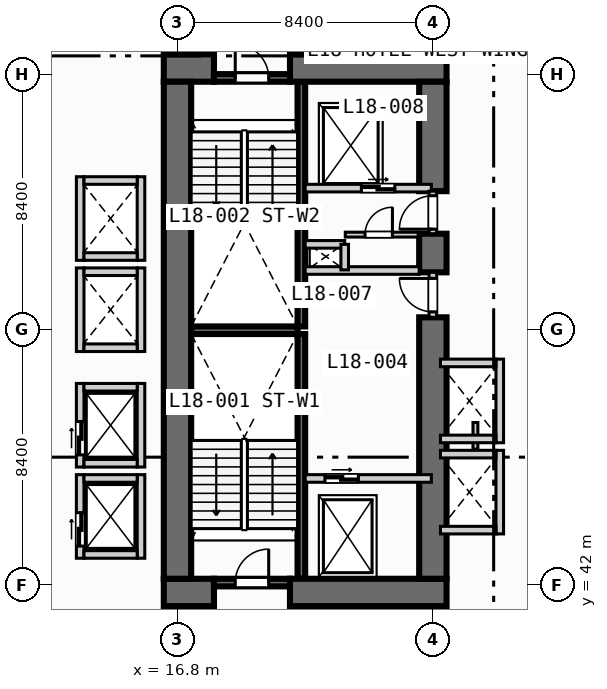
"""IFC4 building model, lengths in metres.
Left out: names, types, materials, properties, quantities, classifications, styles, units other than length and angle.
Written with IfcOpenShell. Run it as: python <this file> out.ifc"""

import sys

from ifc_helpers import new_model, si_unit, direction, frame, frame_2d, origin, place, context, subcontext, project, spatial, rectangle, extrude, element, fill, save


model = new_model("IFC4")
c1 = context("Model", 3, precision=1e-05, world=origin(), true_north=direction((0.0, 1.0)))
c2 = subcontext(c1, "Body", "Model", "MODEL_VIEW")
j1 = project(units=[si_unit("LENGTHUNIT", "METRE"), si_unit("PLANEANGLEUNIT", "RADIAN")], contexts=[c1])
p1 = place(None, origin())
s1 = spatial("IfcSite", under=j1, at=p1, CompositionType="ELEMENT")
p2 = place(p1, origin())
s2 = spatial("IfcBuilding", under=s1, at=p2, CompositionType="ELEMENT")
p3 = place(p2, frame((0.0, 0.0, 77.6)))
s3 = spatial("IfcBuildingStorey", under=s2, at=p3, CompositionType="ELEMENT", Elevation=77.6)
for number, where, z_axis, x_axis in (
    (1, (20.875, 42.2, 0.0), (0.0, 0.0, 1.0), (0.0, 1.0, 0.0)),
    (2, (20.875, 50.5, 0.0), (0.0, 0.0, 1.0), (0.0, 1.0, 0.0)),
):
    element("IfcWall", number, at=place(p3, frame(where, z_axis=z_axis, x_axis=x_axis)), inside=s3, PredefinedType="SOLIDWALL", context=c2, shape_type="SweptSolid", body=[
        extrude(rectangle(XDim=8.05, YDim=0.25, at=frame_2d((4.025, 0.0))), origin(), (0.0, 0.0, 1.0), 3.55),
    ])
p4 = place(p3, frame((17.25, 50.375, 0.0), z_axis=(0.0, 0.0, 1.0), x_axis=(1.0, 0.0, 0.0)))
e3 = element("IfcWall", 3, at=p4, inside=s3, PredefinedType="SOLIDWALL", context=c2, shape_type="SweptSolid", body=[
    extrude(rectangle(XDim=3.5, YDim=0.25, at=frame_2d((1.75, 0.0))), origin(), (0.0, 0.0, 1.0), 3.55),
])
p5 = place(p3, frame((16.35, 41.75, 0.0), z_axis=(0.0, 0.0, 1.0), x_axis=(1.0, 0.0, 0.0)))
e4 = element("IfcWall", 4, at=p5, inside=s3, PredefinedType="SHEAR", context=c2, shape_type="SweptSolid", body=[
    extrude(rectangle(XDim=1.65, YDim=0.9, at=frame_2d((0.825, 0.0))), origin(), (0.0, 0.0, 1.0), 3.55),
])
p6 = place(p3, frame((20.5, 41.75, 0.0), z_axis=(0.0, 0.0, 1.0), x_axis=(1.0, 0.0, 0.0)))
e5 = element("IfcWall", 5, at=p6, inside=s3, PredefinedType="SHEAR", context=c2, shape_type="SweptSolid", body=[
    extrude(rectangle(XDim=5.15, YDim=0.9, at=frame_2d((2.575, 0.0))), origin(), (0.0, 0.0, 1.0), 3.55),
])
p7 = place(p3, frame((16.35, 59.0, 0.0), z_axis=(0.0, 0.0, 1.0), x_axis=(1.0, 0.0, 0.0)))
e6 = element("IfcWall", 6, at=p7, inside=s3, PredefinedType="SHEAR", context=c2, shape_type="SweptSolid", body=[
    extrude(rectangle(XDim=1.65, YDim=0.9, at=frame_2d((0.825, 0.0))), origin(), (0.0, 0.0, 1.0), 3.55),
])
p8 = place(p3, frame((20.5, 59.0, 0.0), z_axis=(0.0, 0.0, 1.0), x_axis=(1.0, 0.0, 0.0)))
e7 = element("IfcWall", 7, at=p8, inside=s3, PredefinedType="SHEAR", context=c2, shape_type="SweptSolid", body=[
    extrude(rectangle(XDim=5.15, YDim=0.9, at=frame_2d((2.575, 0.0))), origin(), (0.0, 0.0, 1.0), 3.55),
])
p9 = place(p3, frame((16.8, 42.2, 0.0), z_axis=(0.0, 0.0, 1.0), x_axis=(0.0, 1.0, 0.0)))
e8 = element("IfcWall", 8, at=p9, inside=s3, PredefinedType="SHEAR", context=c2, shape_type="SweptSolid", body=[
    extrude(rectangle(XDim=16.35, YDim=0.9, at=frame_2d((8.175, 0.0))), origin(), (0.0, 0.0, 1.0), 3.55),
])
p10 = place(p3, frame((25.2, 42.2, 0.0), z_axis=(0.0, 0.0, 1.0), x_axis=(0.0, 1.0, 0.0)))
e9 = element("IfcWall", 9, at=p10, inside=s3, PredefinedType="SHEAR", context=c2, shape_type="SweptSolid", body=[
    extrude(rectangle(XDim=8.6, YDim=0.9, at=frame_2d((4.3, 0.0))), origin(), (0.0, 0.0, 1.0), 3.55),
])
p11 = place(p3, frame((25.2, 52.28, 0.0), z_axis=(0.0, 0.0, 1.0), x_axis=(0.0, 1.0, 0.0)))
e10 = element("IfcWall", 10, at=p11, inside=s3, PredefinedType="SHEAR", context=c2, shape_type="SweptSolid", body=[
    extrude(rectangle(XDim=1.27, YDim=0.9, at=frame_2d((0.635, 0.0))), origin(), (0.0, 0.0, 1.0), 3.55),
])
p12 = place(p3, frame((25.2, 54.95, 0.0), z_axis=(0.0, 0.0, 1.0), x_axis=(0.0, 1.0, 0.0)))
e11 = element("IfcWall", 11, at=p12, inside=s3, PredefinedType="SHEAR", context=c2, shape_type="SweptSolid", body=[
    extrude(rectangle(XDim=3.6, YDim=0.9, at=frame_2d((1.8, 0.0))), origin(), (0.0, 0.0, 1.0), 3.55),
])
p13 = place(p3, frame((18.0, 42.075, 0.0), z_axis=(0.0, 0.0, 1.0), x_axis=(1.0, 0.0, 0.0)))
e12 = element("IfcWall", 12, at=p13, inside=s3, PredefinedType="SOLIDWALL", context=c2, shape_type="SweptSolid", body=[
    extrude(rectangle(XDim=2.5, YDim=0.25, at=frame_2d((1.25, 0.0))), origin(), (0.0, 0.0, 1.0), 3.55),
])
p14 = place(p13, frame((0.7, 0.0, 0.0)))
e13 = element("IfcOpeningElement", 13, at=p14, cuts=e12, PredefinedType="OPENING", context=c2, shape_type="SweptSolid", body=[
    extrude(rectangle(XDim=1.1, YDim=2.15, at=frame_2d((0.55, 1.075))), frame((0.0, 0.135, 0.0), z_axis=(0.0, -1.0, 0.0), x_axis=(1.0, 0.0, 0.0)), (0.0, 0.0, 1.0), 0.27),
])
p15 = place(p3, frame((18.0, 58.675, 0.0), z_axis=(0.0, 0.0, 1.0), x_axis=(1.0, 0.0, 0.0)))
e14 = element("IfcWall", 14, at=p15, inside=s3, PredefinedType="SOLIDWALL", context=c2, shape_type="SweptSolid", body=[
    extrude(rectangle(XDim=2.5, YDim=0.25, at=frame_2d((1.25, 0.0))), origin(), (0.0, 0.0, 1.0), 3.55),
])
p16 = place(p15, frame((0.7, 0.0, 0.0)))
e15 = element("IfcOpeningElement", 15, at=p16, cuts=e14, PredefinedType="OPENING", context=c2, shape_type="SweptSolid", body=[
    extrude(rectangle(XDim=1.1, YDim=2.15, at=frame_2d((0.55, 1.075))), frame((0.0, 0.135, 0.0), z_axis=(0.0, -1.0, 0.0), x_axis=(1.0, 0.0, 0.0)), (0.0, 0.0, 1.0), 0.27),
])
p17 = place(p3, frame((21.0, 45.5, 0.0), z_axis=(0.0, 0.0, 1.0), x_axis=(1.0, 0.0, 0.0)))
e16 = element("IfcWall", 16, at=p17, inside=s3, PredefinedType="SOLIDWALL", context=c2, shape_type="SweptSolid", body=[
    extrude(rectangle(XDim=4.15, YDim=0.25, at=frame_2d((2.075, 0.0))), origin(), (0.0, 0.0, 1.0), 3.55),
])
p18 = place(p17, frame((0.65, 0.0, 0.0)))
e17 = element("IfcOpeningElement", 17, at=p18, cuts=e16, PredefinedType="OPENING", context=c2, shape_type="SweptSolid", body=[
    extrude(rectangle(XDim=1.1, YDim=2.15, at=frame_2d((0.55, 1.075))), frame((0.0, 0.135, 0.0), z_axis=(0.0, -1.0, 0.0), x_axis=(1.0, 0.0, 0.0)), (0.0, 0.0, 1.0), 0.27),
])
p19 = place(p3, frame((25.2, 50.8, 0.0), z_axis=(0.0, 0.0, 1.0), x_axis=(0.0, 1.0, 0.0)))
e18 = element("IfcWall", 18, at=p19, inside=s3, PredefinedType="SOLIDWALL", context=c2, shape_type="SweptSolid", body=[
    extrude(rectangle(XDim=1.48, YDim=0.25, at=frame_2d((0.74, 0.0))), origin(), (0.0, 0.0, 1.0), 3.55),
])
p20 = place(p19, frame((0.18, 0.0, 0.0)))
e19 = element("IfcOpeningElement", 19, at=p20, cuts=e18, PredefinedType="OPENING", context=c2, shape_type="SweptSolid", body=[
    extrude(rectangle(XDim=1.1, YDim=2.15, at=frame_2d((0.55, 1.075))), frame((0.0, 0.135, 0.0), z_axis=(0.0, -1.0, 0.0), x_axis=(1.0, 0.0, 0.0)), (0.0, 0.0, 1.0), 0.27),
])
p21 = place(p3, frame((21.0, 52.34, 0.0), z_axis=(0.0, 0.0, 1.0), x_axis=(1.0, 0.0, 0.0)))
e20 = element("IfcWall", 20, at=p21, inside=s3, PredefinedType="SOLIDWALL", context=c2, shape_type="SweptSolid", body=[
    extrude(rectangle(XDim=3.75, YDim=0.25, at=frame_2d((1.875, 0.0))), origin(), (0.0, 0.0, 1.0), 3.55),
])
p22 = place(p3, frame((21.0, 55.05, 0.0), z_axis=(0.0, 0.0, 1.0), x_axis=(1.0, 0.0, 0.0)))
e21 = element("IfcWall", 21, at=p22, inside=s3, PredefinedType="SOLIDWALL", context=c2, shape_type="SweptSolid", body=[
    extrude(rectangle(XDim=4.15, YDim=0.25, at=frame_2d((2.075, 0.0))), origin(), (0.0, 0.0, 1.0), 3.55),
])
p23 = place(p22, frame((1.85, 0.0, 0.0)))
e22 = element("IfcOpeningElement", 22, at=p23, cuts=e21, PredefinedType="OPENING", context=c2, shape_type="SweptSolid", body=[
    extrude(rectangle(XDim=1.1, YDim=2.15, at=frame_2d((0.55, 1.075))), frame((0.0, 0.135, 0.0), z_axis=(0.0, -1.0, 0.0), x_axis=(1.0, 0.0, 0.0)), (0.0, 0.0, 1.0), 0.27),
])
p24 = place(p3, frame((25.2, 53.55, 0.0), z_axis=(0.0, 0.0, 1.0), x_axis=(0.0, 1.0, 0.0)))
e23 = element("IfcWall", 23, at=p24, inside=s3, PredefinedType="SOLIDWALL", context=c2, shape_type="SweptSolid", body=[
    extrude(rectangle(XDim=1.4, YDim=0.25, at=frame_2d((0.7, 0.0))), origin(), (0.0, 0.0, 1.0), 3.55),
])
p25 = place(p24, frame((0.15, 0.0, 0.0)))
e24 = element("IfcOpeningElement", 24, at=p25, cuts=e23, PredefinedType="OPENING", context=c2, shape_type="SweptSolid", body=[
    extrude(rectangle(XDim=1.1, YDim=2.15, at=frame_2d((0.55, 1.075))), frame((0.0, 0.135, 0.0), z_axis=(0.0, -1.0, 0.0), x_axis=(1.0, 0.0, 0.0)), (0.0, 0.0, 1.0), 0.27),
])
p26 = place(p3, frame((21.0, 53.2, 0.0), z_axis=(0.0, 0.0, 1.0), x_axis=(1.0, 0.0, 0.0)))
e25 = element("IfcWall", 25, at=p26, inside=s3, PredefinedType="SOLIDWALL", context=c2, shape_type="SweptSolid", body=[
    extrude(rectangle(XDim=1.3, YDim=0.25, at=frame_2d((0.65, 0.0))), origin(), (0.0, 0.0, 1.0), 3.55),
])
p27 = place(p3, frame((22.3, 52.36, 0.0), z_axis=(0.0, 0.0, 1.0), x_axis=(0.0, 1.0, 0.0)))
e26 = element("IfcWall", 26, at=p27, inside=s3, PredefinedType="SOLIDWALL", context=c2, shape_type="SweptSolid", body=[
    extrude(rectangle(XDim=0.84, YDim=0.25, at=frame_2d((0.42, 0.0))), origin(), (0.0, 0.0, 1.0), 3.55),
])
p28 = place(p3, frame((22.32, 53.52, 0.0), z_axis=(0.0, 0.0, 1.0), x_axis=(1.0, 0.0, 0.0)))
e27 = element("IfcWall", 27, at=p28, inside=s3, PredefinedType="PARTITIONING", context=c2, shape_type="SweptSolid", body=[
    extrude(rectangle(XDim=2.4, YDim=0.16, at=frame_2d((1.2, 0.0))), origin(), (0.0, 0.0, 1.0), 3.55),
])
p29 = place(p28, frame((0.65, 0.0, 0.0)))
e28 = element("IfcOpeningElement", 28, at=p29, cuts=e27, PredefinedType="OPENING", context=c2, shape_type="SweptSolid", body=[
    extrude(rectangle(XDim=0.9, YDim=2.1, at=frame_2d((0.45, 1.05))), frame((0.0, 0.09, 0.0), z_axis=(0.0, -1.0, 0.0), x_axis=(1.0, 0.0, 0.0)), (0.0, 0.0, 1.0), 0.18),
])
p30 = place(p3, frame((13.6, 42.875, 0.0), z_axis=(0.0, 0.0, 1.0), x_axis=(0.0, 1.0, 0.0)))
e29 = element("IfcWall", 29, at=p30, inside=s3, PredefinedType="SOLIDWALL", context=c2, shape_type="SweptSolid", body=[
    extrude(rectangle(XDim=2.75, YDim=0.25, at=frame_2d((1.375, 0.0))), origin(), (0.0, 0.0, 1.0), 3.55),
])
p31 = place(p30, frame((0.4, 0.0, 0.0)))
e30 = element("IfcOpeningElement", 30, at=p31, cuts=e29, PredefinedType="OPENING", context=c2, shape_type="SweptSolid", body=[
    extrude(rectangle(XDim=1.1, YDim=2.15, at=frame_2d((0.55, 1.075))), frame((0.0, 0.135, 0.0), z_axis=(0.0, -1.0, 0.0), x_axis=(1.0, 0.0, 0.0)), (0.0, 0.0, 1.0), 0.27),
])
p32 = place(p3, frame((15.6, 42.875, 0.0), z_axis=(0.0, 0.0, 1.0), x_axis=(0.0, 1.0, 0.0)))
e31 = element("IfcWall", 31, at=p32, inside=s3, PredefinedType="SOLIDWALL", context=c2, shape_type="SweptSolid", body=[
    extrude(rectangle(XDim=2.75, YDim=0.25, at=frame_2d((1.375, 0.0))), origin(), (0.0, 0.0, 1.0), 3.55),
])
for number, where, z_axis, x_axis in (
    (32, (13.725, 43.0, 0.0), (0.0, 0.0, 1.0), (1.0, 0.0, 0.0)),
    (33, (13.725, 45.5, 0.0), (0.0, 0.0, 1.0), (1.0, 0.0, 0.0)),
):
    element("IfcWall", number, at=place(p3, frame(where, z_axis=z_axis, x_axis=x_axis)), inside=s3, PredefinedType="SOLIDWALL", context=c2, shape_type="SweptSolid", body=[
        extrude(rectangle(XDim=1.75, YDim=0.25, at=frame_2d((0.875, 0.0))), origin(), (0.0, 0.0, 1.0), 3.55),
    ])
p33 = place(p3, frame((13.6, 45.875, 0.0), z_axis=(0.0, 0.0, 1.0), x_axis=(0.0, 1.0, 0.0)))
e34 = element("IfcWall", 34, at=p33, inside=s3, PredefinedType="SOLIDWALL", context=c2, shape_type="SweptSolid", body=[
    extrude(rectangle(XDim=2.75, YDim=0.25, at=frame_2d((1.375, 0.0))), origin(), (0.0, 0.0, 1.0), 3.55),
])
p34 = place(p33, frame((0.4, 0.0, 0.0)))
e35 = element("IfcOpeningElement", 35, at=p34, cuts=e34, PredefinedType="OPENING", context=c2, shape_type="SweptSolid", body=[
    extrude(rectangle(XDim=1.1, YDim=2.15, at=frame_2d((0.55, 1.075))), frame((0.0, 0.135, 0.0), z_axis=(0.0, -1.0, 0.0), x_axis=(1.0, 0.0, 0.0)), (0.0, 0.0, 1.0), 0.27),
])
p35 = place(p3, frame((15.6, 45.875, 0.0), z_axis=(0.0, 0.0, 1.0), x_axis=(0.0, 1.0, 0.0)))
e36 = element("IfcWall", 36, at=p35, inside=s3, PredefinedType="SOLIDWALL", context=c2, shape_type="SweptSolid", body=[
    extrude(rectangle(XDim=2.75, YDim=0.25, at=frame_2d((1.375, 0.0))), origin(), (0.0, 0.0, 1.0), 3.55),
])
for number, where, z_axis, x_axis in (
    (37, (13.725, 46.0, 0.0), (0.0, 0.0, 1.0), (1.0, 0.0, 0.0)),
    (38, (13.725, 48.5, 0.0), (0.0, 0.0, 1.0), (1.0, 0.0, 0.0)),
):
    element("IfcWall", number, at=place(p3, frame(where, z_axis=z_axis, x_axis=x_axis)), inside=s3, PredefinedType="SOLIDWALL", context=c2, shape_type="SweptSolid", body=[
        extrude(rectangle(XDim=1.75, YDim=0.25, at=frame_2d((0.875, 0.0))), origin(), (0.0, 0.0, 1.0), 3.55),
    ])
for number, where, z_axis, x_axis in (
    (39, (13.6, 49.675, 0.0), (0.0, 0.0, 1.0), (0.0, 1.0, 0.0)),
    (40, (15.6, 49.675, 0.0), (0.0, 0.0, 1.0), (0.0, 1.0, 0.0)),
):
    element("IfcWall", number, at=place(p3, frame(where, z_axis=z_axis, x_axis=x_axis)), inside=s3, PredefinedType="SOLIDWALL", context=c2, shape_type="SweptSolid", body=[
        extrude(rectangle(XDim=2.75, YDim=0.25, at=frame_2d((1.375, 0.0))), origin(), (0.0, 0.0, 1.0), 3.55),
    ])
for number, where, z_axis, x_axis in (
    (41, (13.725, 49.8, 0.0), (0.0, 0.0, 1.0), (1.0, 0.0, 0.0)),
    (42, (13.725, 52.3, 0.0), (0.0, 0.0, 1.0), (1.0, 0.0, 0.0)),
):
    element("IfcWall", number, at=place(p3, frame(where, z_axis=z_axis, x_axis=x_axis)), inside=s3, PredefinedType="SOLIDWALL", context=c2, shape_type="SweptSolid", body=[
        extrude(rectangle(XDim=1.75, YDim=0.25, at=frame_2d((0.875, 0.0))), origin(), (0.0, 0.0, 1.0), 3.55),
    ])
for number, where, z_axis, x_axis in (
    (43, (13.6, 52.675, 0.0), (0.0, 0.0, 1.0), (0.0, 1.0, 0.0)),
    (44, (15.6, 52.675, 0.0), (0.0, 0.0, 1.0), (0.0, 1.0, 0.0)),
):
    element("IfcWall", number, at=place(p3, frame(where, z_axis=z_axis, x_axis=x_axis)), inside=s3, PredefinedType="SOLIDWALL", context=c2, shape_type="SweptSolid", body=[
        extrude(rectangle(XDim=2.75, YDim=0.25, at=frame_2d((1.375, 0.0))), origin(), (0.0, 0.0, 1.0), 3.55),
    ])
for number, where, z_axis, x_axis in (
    (45, (13.725, 52.8, 0.0), (0.0, 0.0, 1.0), (1.0, 0.0, 0.0)),
    (46, (13.725, 55.3, 0.0), (0.0, 0.0, 1.0), (1.0, 0.0, 0.0)),
):
    element("IfcWall", number, at=place(p3, frame(where, z_axis=z_axis, x_axis=x_axis)), inside=s3, PredefinedType="SOLIDWALL", context=c2, shape_type="SweptSolid", body=[
        extrude(rectangle(XDim=1.75, YDim=0.25, at=frame_2d((0.875, 0.0))), origin(), (0.0, 0.0, 1.0), 3.55),
    ])
p36 = place(p3, frame((27.4, 43.675, 0.0), z_axis=(0.0, 0.0, 1.0), x_axis=(0.0, 1.0, 0.0)))
e47 = element("IfcWall", 47, at=p36, inside=s3, PredefinedType="SOLIDWALL", context=c2, shape_type="SweptSolid", body=[
    extrude(rectangle(XDim=2.75, YDim=0.25, at=frame_2d((1.375, 0.0))), origin(), (0.0, 0.0, 1.0), 3.55),
])
for number, where, z_axis, x_axis in (
    (48, (25.45, 43.8, 0.0), (0.0, 0.0, 1.0), (1.0, 0.0, 0.0)),
    (49, (25.45, 46.3, 0.0), (0.0, 0.0, 1.0), (1.0, 0.0, 0.0)),
):
    element("IfcWall", number, at=place(p3, frame(where, z_axis=z_axis, x_axis=x_axis)), inside=s3, PredefinedType="SOLIDWALL", context=c2, shape_type="SweptSolid", body=[
        extrude(rectangle(XDim=1.825, YDim=0.25, at=frame_2d((0.913, 0.0))), origin(), (0.0, 0.0, 1.0), 3.55),
    ])
p37 = place(p3, frame((26.6, 46.46, 0.0), z_axis=(0.0, 0.0, 1.0), x_axis=(0.0, 1.0, 0.0)))
e50 = element("IfcWall", 50, at=p37, inside=s3, PredefinedType="PARTITIONING", context=c2, shape_type="SweptSolid", body=[
    extrude(rectangle(XDim=0.88, YDim=0.16, at=frame_2d((0.44, 0.0))), origin(), (0.0, 0.0, 1.0), 3.55),
])
p38 = place(p3, frame((27.4, 46.675, 0.0), z_axis=(0.0, 0.0, 1.0), x_axis=(0.0, 1.0, 0.0)))
e51 = element("IfcWall", 51, at=p38, inside=s3, PredefinedType="SOLIDWALL", context=c2, shape_type="SweptSolid", body=[
    extrude(rectangle(XDim=2.75, YDim=0.25, at=frame_2d((1.375, 0.0))), origin(), (0.0, 0.0, 1.0), 3.55),
])
for number, where, z_axis, x_axis in (
    (52, (25.45, 46.8, 0.0), (0.0, 0.0, 1.0), (1.0, 0.0, 0.0)),
    (53, (25.45, 49.3, 0.0), (0.0, 0.0, 1.0), (1.0, 0.0, 0.0)),
):
    element("IfcWall", number, at=place(p3, frame(where, z_axis=z_axis, x_axis=x_axis)), inside=s3, PredefinedType="SOLIDWALL", context=c2, shape_type="SweptSolid", body=[
        extrude(rectangle(XDim=1.825, YDim=0.25, at=frame_2d((0.913, 0.0))), origin(), (0.0, 0.0, 1.0), 3.55),
    ])
p39 = place(p14, origin())
e54 = element("IfcDoor", 54, at=p39, inside=s3, OperationType="SINGLE_SWING_RIGHT", PredefinedType="DOOR", context=c2, shape_type="SweptSolid", body=[
    extrude(rectangle(XDim=1.1, YDim=2.15, at=frame_2d((0.55, 1.075))), frame((0.0, 0.025, 0.0), z_axis=(0.0, -1.0, 0.0), x_axis=(1.0, 0.0, 0.0)), (0.0, 0.0, 1.0), 0.05),
])
fill(e13, e54)
p40 = place(p16, origin())
e55 = element("IfcDoor", 55, at=p40, inside=s3, OperationType="SINGLE_SWING_LEFT", PredefinedType="DOOR", context=c2, shape_type="SweptSolid", body=[
    extrude(rectangle(XDim=1.1, YDim=2.15, at=frame_2d((0.55, 1.075))), frame((0.0, 0.025, 0.0), z_axis=(0.0, -1.0, 0.0), x_axis=(1.0, 0.0, 0.0)), (0.0, 0.0, 1.0), 0.05),
])
fill(e15, e55)
p41 = place(p18, origin())
e56 = element("IfcDoor", 56, at=p41, inside=s3, OperationType="SLIDING_TO_LEFT", PredefinedType="DOOR", context=c2, shape_type="SweptSolid", body=[
    extrude(rectangle(XDim=1.1, YDim=2.15, at=frame_2d((0.55, 1.075))), frame((0.0, 0.025, 0.0), z_axis=(0.0, -1.0, 0.0), x_axis=(1.0, 0.0, 0.0)), (0.0, 0.0, 1.0), 0.05),
])
fill(e17, e56)
p42 = place(p20, origin())
e57 = element("IfcDoor", 57, at=p42, inside=s3, OperationType="SINGLE_SWING_RIGHT", PredefinedType="DOOR", context=c2, shape_type="SweptSolid", body=[
    extrude(rectangle(XDim=1.1, YDim=2.15, at=frame_2d((0.55, 1.075))), frame((0.0, 0.025, 0.0), z_axis=(0.0, -1.0, 0.0), x_axis=(1.0, 0.0, 0.0)), (0.0, 0.0, 1.0), 0.05),
])
fill(e19, e57)
p43 = place(p23, origin())
e58 = element("IfcDoor", 58, at=p43, inside=s3, OperationType="SLIDING_TO_LEFT", PredefinedType="DOOR", context=c2, shape_type="SweptSolid", body=[
    extrude(rectangle(XDim=1.1, YDim=2.15, at=frame_2d((0.55, 1.075))), frame((0.0, 0.025, 0.0), z_axis=(0.0, -1.0, 0.0), x_axis=(1.0, 0.0, 0.0)), (0.0, 0.0, 1.0), 0.05),
])
fill(e22, e58)
p44 = place(p25, origin())
e59 = element("IfcDoor", 59, at=p44, inside=s3, OperationType="SINGLE_SWING_LEFT", PredefinedType="DOOR", context=c2, shape_type="SweptSolid", body=[
    extrude(rectangle(XDim=1.1, YDim=2.15, at=frame_2d((0.55, 1.075))), frame((0.0, 0.025, 0.0), z_axis=(0.0, -1.0, 0.0), x_axis=(1.0, 0.0, 0.0)), (0.0, 0.0, 1.0), 0.05),
])
fill(e24, e59)
p45 = place(p29, origin())
e60 = element("IfcDoor", 60, at=p45, inside=s3, OperationType="SINGLE_SWING_RIGHT", PredefinedType="DOOR", context=c2, shape_type="SweptSolid", body=[
    extrude(rectangle(XDim=0.9, YDim=2.1, at=frame_2d((0.45, 1.05))), frame((0.0, 0.025, 0.0), z_axis=(0.0, -1.0, 0.0), x_axis=(1.0, 0.0, 0.0)), (0.0, 0.0, 1.0), 0.05),
])
fill(e28, e60)
p46 = place(p31, origin())
e61 = element("IfcDoor", 61, at=p46, inside=s3, OperationType="SLIDING_TO_LEFT", PredefinedType="DOOR", context=c2, shape_type="SweptSolid", body=[
    extrude(rectangle(XDim=1.1, YDim=2.15, at=frame_2d((0.55, 1.075))), frame((0.0, 0.025, 0.0), z_axis=(0.0, -1.0, 0.0), x_axis=(1.0, 0.0, 0.0)), (0.0, 0.0, 1.0), 0.05),
])
fill(e30, e61)
p47 = place(p34, origin())
e62 = element("IfcDoor", 62, at=p47, inside=s3, OperationType="SLIDING_TO_LEFT", PredefinedType="DOOR", context=c2, shape_type="SweptSolid", body=[
    extrude(rectangle(XDim=1.1, YDim=2.15, at=frame_2d((0.55, 1.075))), frame((0.0, 0.025, 0.0), z_axis=(0.0, -1.0, 0.0), x_axis=(1.0, 0.0, 0.0)), (0.0, 0.0, 1.0), 0.05),
])
fill(e35, e62)
save(model, sys.argv[1])
